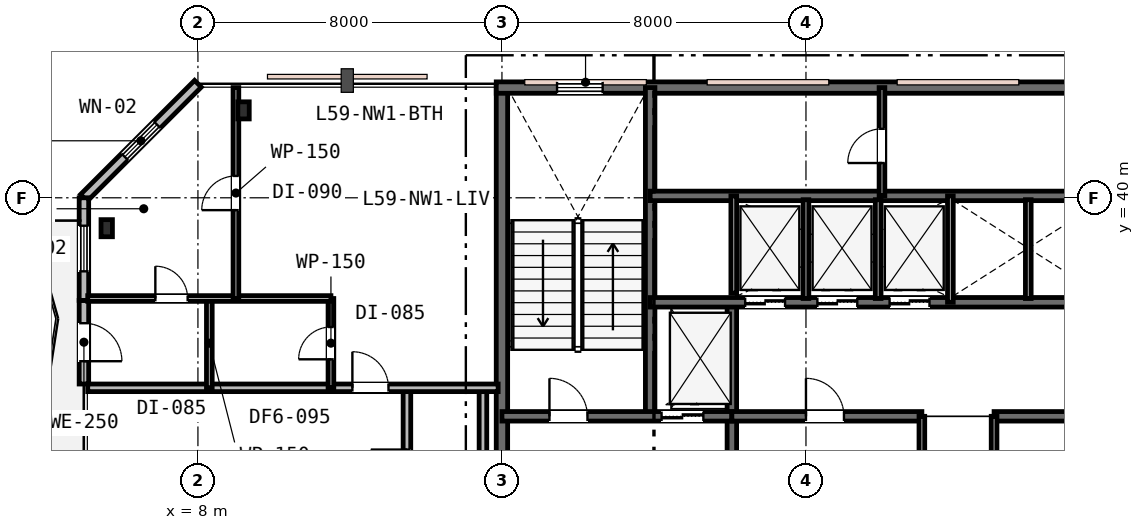
"""IFC4 building model, lengths in metres.
Left out: names, types, materials, properties, quantities, classifications, styles, units other than length and angle.
Written with IfcOpenShell. Run it as: python <this file> out.ifc"""

import sys

from ifc_helpers import new_model, si_unit, direction, frame, frame_2d, origin, origin_2d, place, context, subcontext, project, spatial, rectangle, i_section, extrude, element, fill, save


model = new_model("IFC4")
c1 = context("Model", 3, precision=1e-05, world=origin(), true_north=direction((0.0, 1.0)))
c2 = subcontext(c1, "Body", "Model", "MODEL_VIEW")
j1 = project(units=[si_unit("LENGTHUNIT", "METRE"), si_unit("PLANEANGLEUNIT", "RADIAN")], contexts=[c1])
p1 = place(None, origin())
s1 = spatial("IfcSite", under=j1, at=p1, CompositionType="ELEMENT")
p2 = place(p1, origin())
s2 = spatial("IfcBuilding", under=s1, at=p2, CompositionType="ELEMENT")
p3 = place(p2, frame((0.0, 0.0, 229.8)))
s3 = spatial("IfcBuildingStorey", under=s2, at=p3, CompositionType="ELEMENT", Elevation=229.8)
p4 = place(p3, frame((16.0, 30.65, 0.0), z_axis=(0.0, 0.0, 1.0), x_axis=(0.0, 1.0, 0.0)))
e1 = element("IfcWall", 1, at=p4, inside=s3, PredefinedType="SHEAR", context=c2, shape_type="SweptSolid", body=[
    extrude(rectangle(XDim=12.3, YDim=0.3, at=frame_2d((6.15, 0.0))), origin(), (0.0, 0.0, 1.0), 3.8),
])
p5 = place(p3, frame((15.85, 42.9, 0.0), z_axis=(0.0, 0.0, 1.0), x_axis=(1.0, 0.0, 0.0)))
e2 = element("IfcWall", 2, at=p5, inside=s3, PredefinedType="SHEAR", context=c2, shape_type="SweptSolid", body=[
    extrude(rectangle(XDim=24.3, YDim=0.3, at=frame_2d((12.15, 0.0))), origin(), (0.0, 0.0, 1.0), 3.8),
])
p6 = place(p5, frame((1.6, 0.0, 0.95)))
e3 = element("IfcOpeningElement", 3, at=p6, cuts=e2, PredefinedType="OPENING", context=c2, shape_type="SweptSolid", body=[
    extrude(rectangle(XDim=1.2, YDim=1.6, at=frame_2d((0.6, 0.8))), frame((0.0, 0.16, 0.0), z_axis=(0.0, -1.0, 0.0), x_axis=(1.0, 0.0, 0.0)), (0.0, 0.0, 1.0), 0.32),
])
p7 = place(p5, frame((16.5, 0.0, 0.95)))
e4 = element("IfcOpeningElement", 4, at=p7, cuts=e2, PredefinedType="OPENING", context=c2, shape_type="SweptSolid", body=[
    extrude(rectangle(XDim=1.2, YDim=1.6, at=frame_2d((0.6, 0.8))), frame((0.0, 0.16, 0.0), z_axis=(0.0, -1.0, 0.0), x_axis=(1.0, 0.0, 0.0)), (0.0, 0.0, 1.0), 0.32),
])
p8 = place(p5, frame((21.6, 0.0, 0.95)))
e5 = element("IfcOpeningElement", 5, at=p8, cuts=e2, PredefinedType="OPENING", context=c2, shape_type="SweptSolid", body=[
    extrude(rectangle(XDim=1.2, YDim=1.6, at=frame_2d((0.6, 0.8))), frame((0.0, 0.16, 0.0), z_axis=(0.0, -1.0, 0.0), x_axis=(1.0, 0.0, 0.0)), (0.0, 0.0, 1.0), 0.32),
])
p9 = place(p3, frame((19.9, 34.25, 0.0), z_axis=(0.0, 0.0, 1.0), x_axis=(0.0, 1.0, 0.0)))
e6 = element("IfcWall", 6, at=p9, inside=s3, PredefinedType="SHEAR", context=c2, shape_type="SweptSolid", body=[
    extrude(rectangle(XDim=8.65, YDim=0.25, at=frame_2d((4.325, 0.0))), origin(), (0.0, 0.0, 1.0), 3.8),
])
p10 = place(p3, frame((22.05, 30.8, 0.0), z_axis=(0.0, 0.0, 1.0), x_axis=(0.0, 1.0, 0.0)))
e7 = element("IfcWall", 7, at=p10, inside=s3, PredefinedType="SHEAR", context=c2, shape_type="SweptSolid", body=[
    extrude(rectangle(XDim=6.45, YDim=0.25, at=frame_2d((3.225, 0.0))), origin(), (0.0, 0.0, 1.0), 3.8),
])
p11 = place(p3, frame((16.0, 34.25, 0.0), z_axis=(0.0, 0.0, 1.0), x_axis=(1.0, 0.0, 0.0)))
e8 = element("IfcWall", 8, at=p11, inside=s3, PredefinedType="SHEAR", context=c2, shape_type="SweptSolid", body=[
    extrude(rectangle(XDim=6.05, YDim=0.25, at=frame_2d((3.025, 0.0))), origin(), (0.0, 0.0, 1.0), 3.8),
])
p12 = place(p11, frame((1.25, 0.0, 0.0)))
e9 = element("IfcOpeningElement", 9, at=p12, cuts=e8, PredefinedType="OPENING", context=c2, shape_type="SweptSolid", body=[
    extrude(rectangle(XDim=1.0, YDim=2.15, at=frame_2d((0.5, 1.075))), frame((0.0, 0.135, 0.0), z_axis=(0.0, -1.0, 0.0), x_axis=(1.0, 0.0, 0.0)), (0.0, 0.0, 1.0), 0.27),
])
p13 = place(p11, frame((4.2, 0.0, 0.0)))
e10 = element("IfcOpeningElement", 10, at=p13, cuts=e8, PredefinedType="OPENING", context=c2, shape_type="SweptSolid", body=[
    extrude(rectangle(XDim=1.1, YDim=2.15, at=frame_2d((0.55, 1.075))), frame((0.0, 0.135, 0.0), z_axis=(0.0, -1.0, 0.0), x_axis=(1.0, 0.0, 0.0)), (0.0, 0.0, 1.0), 0.27),
])
p14 = place(p3, frame((22.05, 34.25, 0.0), z_axis=(0.0, 0.0, 1.0), x_axis=(1.0, 0.0, 0.0)))
e11 = element("IfcWall", 11, at=p14, inside=s3, PredefinedType="SHEAR", context=c2, shape_type="SweptSolid", body=[
    extrude(rectangle(XDim=5.0, YDim=0.25, at=frame_2d((2.5, 0.0))), origin(), (0.0, 0.0, 1.0), 3.8),
])
p15 = place(p14, frame((1.95, 0.0, 0.0)))
e12 = element("IfcOpeningElement", 12, at=p15, cuts=e11, PredefinedType="OPENING", context=c2, shape_type="SweptSolid", body=[
    extrude(rectangle(XDim=1.0, YDim=2.15, at=frame_2d((0.5, 1.075))), frame((0.0, 0.135, 0.0), z_axis=(0.0, -1.0, 0.0), x_axis=(1.0, 0.0, 0.0)), (0.0, 0.0, 1.0), 0.27),
])
p16 = place(p3, frame((28.95, 34.25, 0.0), z_axis=(0.0, 0.0, 1.0), x_axis=(1.0, 0.0, 0.0)))
e13 = element("IfcWall", 13, at=p16, inside=s3, PredefinedType="SHEAR", context=c2, shape_type="SweptSolid", body=[
    extrude(rectangle(XDim=5.0, YDim=0.25, at=frame_2d((2.5, 0.0))), origin(), (0.0, 0.0, 1.0), 3.8),
])
p17 = place(p16, frame((1.95, 0.0, 0.0)))
e14 = element("IfcOpeningElement", 14, at=p17, cuts=e13, PredefinedType="OPENING", context=c2, shape_type="SweptSolid", body=[
    extrude(rectangle(XDim=1.0, YDim=2.15, at=frame_2d((0.5, 1.075))), frame((0.0, 0.135, 0.0), z_axis=(0.0, -1.0, 0.0), x_axis=(1.0, 0.0, 0.0)), (0.0, 0.0, 1.0), 0.27),
])
p18 = place(p3, frame((19.9, 37.25, 0.0), z_axis=(0.0, 0.0, 1.0), x_axis=(1.0, 0.0, 0.0)))
e15 = element("IfcWall", 15, at=p18, inside=s3, PredefinedType="SHEAR", context=c2, shape_type="SweptSolid", body=[
    extrude(rectangle(XDim=16.2, YDim=0.25, at=frame_2d((8.1, 0.0))), origin(), (0.0, 0.0, 1.0), 3.8),
])
p19 = place(p18, frame((12.55, 0.0, 0.0)))
e16 = element("IfcOpeningElement", 16, at=p19, cuts=e15, PredefinedType="OPENING", context=c2, shape_type="SweptSolid", body=[
    extrude(rectangle(XDim=0.9, YDim=2.15, at=frame_2d((0.45, 1.075))), frame((0.0, 0.135, 0.0), z_axis=(0.0, -1.0, 0.0), x_axis=(1.0, 0.0, 0.0)), (0.0, 0.0, 1.0), 0.27),
])
p20 = place(p18, frame((2.5, 0.0, 0.0)))
e17 = element("IfcOpeningElement", 17, at=p20, cuts=e15, PredefinedType="OPENING", context=c2, shape_type="SweptSolid", body=[
    extrude(rectangle(XDim=1.05, YDim=2.15, at=frame_2d((0.525, 1.075))), frame((0.0, 0.135, 0.0), z_axis=(0.0, -1.0, 0.0), x_axis=(1.0, 0.0, 0.0)), (0.0, 0.0, 1.0), 0.27),
])
p21 = place(p18, frame((4.4, 0.0, 0.0)))
e18 = element("IfcOpeningElement", 18, at=p21, cuts=e15, PredefinedType="OPENING", context=c2, shape_type="SweptSolid", body=[
    extrude(rectangle(XDim=1.05, YDim=2.15, at=frame_2d((0.525, 1.075))), frame((0.0, 0.135, 0.0), z_axis=(0.0, -1.0, 0.0), x_axis=(1.0, 0.0, 0.0)), (0.0, 0.0, 1.0), 0.27),
])
p22 = place(p18, frame((6.3, 0.0, 0.0)))
e19 = element("IfcOpeningElement", 19, at=p22, cuts=e15, PredefinedType="OPENING", context=c2, shape_type="SweptSolid", body=[
    extrude(rectangle(XDim=1.05, YDim=2.15, at=frame_2d((0.525, 1.075))), frame((0.0, 0.135, 0.0), z_axis=(0.0, -1.0, 0.0), x_axis=(1.0, 0.0, 0.0)), (0.0, 0.0, 1.0), 0.27),
])
p23 = place(p3, frame((19.9, 40.05, 0.0), z_axis=(0.0, 0.0, 1.0), x_axis=(1.0, 0.0, 0.0)))
e20 = element("IfcWall", 20, at=p23, inside=s3, PredefinedType="SHEAR", context=c2, shape_type="SweptSolid", body=[
    extrude(rectangle(XDim=12.05, YDim=0.25, at=frame_2d((6.025, 0.0))), origin(), (0.0, 0.0, 1.0), 3.8),
])
for number, where, z_axis, x_axis in (
    (21, (5.6, 39.2, 0.0), (0.0, 0.0, 1.0), (1.0, 0.0, 0.0)),
    (22, (9.2, 42.3, 0.0), (0.0, 0.0, 1.0), (1.0, 0.0, 0.0)),
):
    element("IfcColumn", number, at=place(p3, frame(where, z_axis=z_axis, x_axis=x_axis)), inside=s3, PredefinedType="COLUMN", context=c2, shape_type="SweptSolid", body=[
        extrude(i_section(OverallWidth=0.3, OverallDepth=0.45, WebThickness=0.014, FlangeThickness=0.026, FilletRadius=0.027, at=origin_2d()), origin(), (0.0, 0.0, 1.0), 3.8),
    ])
p24 = place(p3, frame((8.0, 43.0, 0.0), z_axis=(0.0, 0.0, 1.0), x_axis=(-0.707106781187, -0.707106781187, 0.0)))
e23 = element("IfcWall", 23, at=p24, inside=s3, PredefinedType="STANDARD", context=c2, shape_type="SweptSolid", body=[
    extrude(rectangle(XDim=4.243, YDim=0.25, at=frame_2d((2.121, 0.0))), origin(), (0.0, 0.0, 1.0), 3.53),
])
p25 = place(p24, frame((1.521, 0.0, 0.85)))
e24 = element("IfcOpeningElement", 24, at=p25, cuts=e23, PredefinedType="OPENING", context=c2, shape_type="SweptSolid", body=[
    extrude(rectangle(XDim=1.2, YDim=1.6, at=frame_2d((0.6, 0.8))), frame((0.0, 0.135, 0.0), z_axis=(0.0, -1.0, 0.0), x_axis=(1.0, 0.0, 0.0)), (0.0, 0.0, 1.0), 0.27),
])
p26 = place(p3, frame((5.0, 37.3, 0.0), z_axis=(0.0, 0.0, 1.0), x_axis=(0.0, -1.0, 0.0)))
e25 = element("IfcWall", 25, at=p26, inside=s3, PredefinedType="STANDARD", context=c2, shape_type="SweptSolid", body=[
    extrude(rectangle(XDim=2.2, YDim=0.25, at=frame_2d((1.1, 0.0))), origin(), (0.0, 0.0, 1.0), 3.53),
])
p27 = place(p26, frame((0.6, 0.0, 0.0)))
e26 = element("IfcOpeningElement", 26, at=p27, cuts=e25, PredefinedType="OPENING", context=c2, shape_type="SweptSolid", body=[
    extrude(rectangle(XDim=1.0, YDim=2.15, at=frame_2d((0.5, 1.075))), frame((0.0, 0.135, 0.0), z_axis=(0.0, -1.0, 0.0), x_axis=(1.0, 0.0, 0.0)), (0.0, 0.0, 1.0), 0.27),
])
p28 = place(p3, frame((5.0, 40.0, 0.0), z_axis=(0.0, 0.0, 1.0), x_axis=(0.0, -1.0, 0.0)))
e27 = element("IfcWall", 27, at=p28, inside=s3, PredefinedType="STANDARD", context=c2, shape_type="SweptSolid", body=[
    extrude(rectangle(XDim=2.7, YDim=0.25, at=frame_2d((1.35, 0.0))), origin(), (0.0, 0.0, 1.0), 3.53),
])
p29 = place(p28, frame((0.735, 0.0, 0.85)))
e28 = element("IfcOpeningElement", 28, at=p29, cuts=e27, PredefinedType="OPENING", context=c2, shape_type="SweptSolid", body=[
    extrude(rectangle(XDim=1.2, YDim=1.6, at=frame_2d((0.6, 0.8))), frame((0.0, 0.135, 0.0), z_axis=(0.0, -1.0, 0.0), x_axis=(1.0, 0.0, 0.0)), (0.0, 0.0, 1.0), 0.27),
])
for number, where, z_axis, x_axis in (
    (29, (27.05, 30.8, 0.0), (0.0, 0.0, 1.0), (0.0, 1.0, 0.0)),
    (30, (28.95, 30.8, 0.0), (0.0, 0.0, 1.0), (0.0, 1.0, 0.0)),
):
    element("IfcWall", number, at=place(p3, frame(where, z_axis=z_axis, x_axis=x_axis)), inside=s3, PredefinedType="PLUMBINGWALL", context=c2, shape_type="SweptSolid", body=[
        extrude(rectangle(XDim=3.45, YDim=0.15, at=frame_2d((1.725, 0.0))), origin(), (0.0, 0.0, 1.0), 3.22),
    ])
p30 = place(p3, frame((22.1, 37.49, 0.0), z_axis=(0.0, 0.0, 1.0), x_axis=(0.0, 1.0, 0.0)))
e31 = element("IfcWall", 31, at=p30, inside=s3, PredefinedType="PLUMBINGWALL", context=c2, shape_type="SweptSolid", body=[
    extrude(rectangle(XDim=2.56, YDim=0.15, at=frame_2d((1.28, 0.0))), origin(), (0.0, 0.0, 1.0), 3.53),
])
p31 = place(p3, frame((27.8, 37.25, 0.0), z_axis=(0.0, 0.0, 1.0), x_axis=(0.0, 1.0, 0.0)))
e32 = element("IfcWall", 32, at=p31, inside=s3, PredefinedType="PLUMBINGWALL", context=c2, shape_type="SweptSolid", body=[
    extrude(rectangle(XDim=2.8, YDim=0.15, at=frame_2d((1.4, 0.0))), origin(), (0.0, 0.0, 1.0), 3.53),
])
for number, where, z_axis, x_axis in (
    (33, (24.0, 37.35, 0.0), (0.0, 0.0, 1.0), (0.0, 1.0, 0.0)),
    (34, (25.9, 37.35, 0.0), (0.0, 0.0, 1.0), (0.0, 1.0, 0.0)),
    (35, (29.85, 37.35, 0.0), (0.0, 0.0, 1.0), (0.0, 1.0, 0.0)),
):
    element("IfcWall", number, at=place(p3, frame(where, z_axis=z_axis, x_axis=x_axis)), inside=s3, PredefinedType="PLUMBINGWALL", context=c2, shape_type="SweptSolid", body=[
        extrude(rectangle(XDim=2.6, YDim=0.15, at=frame_2d((1.3, 0.0))), origin(), (0.0, 0.0, 1.0), 3.53),
    ])
p32 = place(p3, frame((26.0, 40.05, 0.0), z_axis=(0.0, 0.0, 1.0), x_axis=(0.0, 1.0, 0.0)))
e36 = element("IfcWall", 36, at=p32, inside=s3, PredefinedType="PARTITIONING", context=c2, shape_type="SweptSolid", body=[
    extrude(rectangle(XDim=2.85, YDim=0.15, at=frame_2d((1.425, 0.0))), origin(), (0.0, 0.0, 1.0), 3.53),
])
p33 = place(p32, frame((0.865, 0.0, 0.0)))
e37 = element("IfcOpeningElement", 37, at=p33, cuts=e36, PredefinedType="OPENING", context=c2, shape_type="SweptSolid", body=[
    extrude(rectangle(XDim=0.9, YDim=2.15, at=frame_2d((0.45, 1.075))), frame((0.0, 0.085, 0.0), z_axis=(0.0, -1.0, 0.0), x_axis=(1.0, 0.0, 0.0)), (0.0, 0.0, 1.0), 0.17),
])
p34 = place(p3, frame((15.5, 30.8, 0.0), z_axis=(0.0, 0.0, 1.0), x_axis=(0.0, 1.0, 0.0)))
e38 = element("IfcWall", 38, at=p34, inside=s3, PredefinedType="PARTITIONING", context=c2, shape_type="SweptSolid", body=[
    extrude(rectangle(XDim=4.2, YDim=0.2, at=frame_2d((2.1, 0.0))), origin(), (0.0, 0.0, 1.0), 2.92),
])
p35 = place(p3, frame((13.5, 28.6, 0.0), z_axis=(0.0, 0.0, 1.0), x_axis=(0.0, 1.0, 0.0)))
e39 = element("IfcWall", 39, at=p35, inside=s3, PredefinedType="PARTITIONING", context=c2, shape_type="SweptSolid", body=[
    extrude(rectangle(XDim=6.4, YDim=0.2, at=frame_2d((3.2, 0.0))), origin(), (0.0, 0.0, 1.0), 2.92),
])
p36 = place(p35, frame((3.825, 0.0, 0.0)))
e40 = element("IfcOpeningElement", 40, at=p36, cuts=e39, PredefinedType="OPENING", context=c2, shape_type="SweptSolid", body=[
    extrude(rectangle(XDim=0.95, YDim=2.15, at=frame_2d((0.475, 1.075))), frame((0.0, 0.11, 0.0), z_axis=(0.0, -1.0, 0.0), x_axis=(1.0, 0.0, 0.0)), (0.0, 0.0, 1.0), 0.22),
])
p37 = place(p3, frame((5.1, 35.0, 0.0), z_axis=(0.0, 0.0, 1.0), x_axis=(1.0, 0.0, 0.0)))
e41 = element("IfcWall", 41, at=p37, inside=s3, PredefinedType="PARTITIONING", context=c2, shape_type="SweptSolid", body=[
    extrude(rectangle(XDim=10.8, YDim=0.2, at=frame_2d((5.4, 0.0))), origin(), (0.0, 0.0, 1.0), 3.24),
])
p38 = place(p37, frame((6.964, 0.0, 0.0)))
e42 = element("IfcOpeningElement", 42, at=p38, cuts=e41, PredefinedType="OPENING", context=c2, shape_type="SweptSolid", body=[
    extrude(rectangle(XDim=0.95, YDim=2.15, at=frame_2d((0.475, 1.075))), frame((0.0, 0.11, 0.0), z_axis=(0.0, -1.0, 0.0), x_axis=(1.0, 0.0, 0.0)), (0.0, 0.0, 1.0), 0.22),
])
p39 = place(p3, frame((11.5, 35.0, 0.0), z_axis=(0.0, 0.0, 1.0), x_axis=(0.0, 1.0, 0.0)))
e43 = element("IfcWall", 43, at=p39, inside=s3, PredefinedType="PARTITIONING", context=c2, shape_type="SweptSolid", body=[
    extrude(rectangle(XDim=2.35, YDim=0.15, at=frame_2d((1.175, 0.0))), origin(), (0.0, 0.0, 1.0), 3.53),
])
p40 = place(p39, frame((0.75, 0.0, 0.0)))
e44 = element("IfcOpeningElement", 44, at=p40, cuts=e43, PredefinedType="OPENING", context=c2, shape_type="SweptSolid", body=[
    extrude(rectangle(XDim=0.85, YDim=2.15, at=frame_2d((0.425, 1.075))), frame((0.0, 0.085, 0.0), z_axis=(0.0, -1.0, 0.0), x_axis=(1.0, 0.0, 0.0)), (0.0, 0.0, 1.0), 0.17),
])
p41 = place(p3, frame((8.3, 35.0, 0.0), z_axis=(0.0, 0.0, 1.0), x_axis=(0.0, 1.0, 0.0)))
e45 = element("IfcWall", 45, at=p41, inside=s3, PredefinedType="PARTITIONING", context=c2, shape_type="SweptSolid", body=[
    extrude(rectangle(XDim=2.35, YDim=0.15, at=frame_2d((1.175, 0.0))), origin(), (0.0, 0.0, 1.0), 3.53),
])
p42 = place(p3, frame((5.1, 37.35, 0.0), z_axis=(0.0, 0.0, 1.0), x_axis=(1.0, 0.0, 0.0)))
e46 = element("IfcWall", 46, at=p42, inside=s3, PredefinedType="PARTITIONING", context=c2, shape_type="SweptSolid", body=[
    extrude(rectangle(XDim=6.4, YDim=0.15, at=frame_2d((3.2, 0.0))), origin(), (0.0, 0.0, 1.0), 3.24),
])
p43 = place(p42, frame((1.78, 0.0, 0.0)))
e47 = element("IfcOpeningElement", 47, at=p43, cuts=e46, PredefinedType="OPENING", context=c2, shape_type="SweptSolid", body=[
    extrude(rectangle(XDim=0.85, YDim=2.15, at=frame_2d((0.425, 1.075))), frame((0.0, 0.085, 0.0), z_axis=(0.0, -1.0, 0.0), x_axis=(1.0, 0.0, 0.0)), (0.0, 0.0, 1.0), 0.17),
])
p44 = place(p3, frame((9.0, 37.35, 0.0), z_axis=(0.0, 0.0, 1.0), x_axis=(0.0, 1.0, 0.0)))
e48 = element("IfcWall", 48, at=p44, inside=s3, PredefinedType="PARTITIONING", context=c2, shape_type="SweptSolid", body=[
    extrude(rectangle(XDim=5.55, YDim=0.15, at=frame_2d((2.775, 0.0))), origin(), (0.0, 0.0, 1.0), 3.24),
])
p45 = place(p44, frame((2.325, 0.0, 0.0)))
e49 = element("IfcOpeningElement", 49, at=p45, cuts=e48, PredefinedType="OPENING", context=c2, shape_type="SweptSolid", body=[
    extrude(rectangle(XDim=0.9, YDim=2.15, at=frame_2d((0.45, 1.075))), frame((0.0, 0.085, 0.0), z_axis=(0.0, -1.0, 0.0), x_axis=(1.0, 0.0, 0.0)), (0.0, 0.0, 1.0), 0.17),
])
p46 = place(p6, origin())
e50 = element("IfcWindow", 50, at=p46, inside=s3, PartitioningType="SINGLE_PANEL", PredefinedType="WINDOW", context=c2, shape_type="SweptSolid", body=[
    extrude(rectangle(XDim=1.2, YDim=1.6, at=frame_2d((0.6, 0.8))), frame((0.0, 0.03, 0.0), z_axis=(0.0, -1.0, 0.0), x_axis=(1.0, 0.0, 0.0)), (0.0, 0.0, 1.0), 0.06),
])
fill(e3, e50)
p47 = place(p25, origin())
e51 = element("IfcWindow", 51, at=p47, inside=s3, PartitioningType="SINGLE_PANEL", PredefinedType="WINDOW", context=c2, shape_type="SweptSolid", body=[
    extrude(rectangle(XDim=1.2, YDim=1.6, at=frame_2d((0.6, 0.8))), frame((0.0, 0.03, 0.0), z_axis=(0.0, -1.0, 0.0), x_axis=(1.0, 0.0, 0.0)), (0.0, 0.0, 1.0), 0.06),
])
fill(e24, e51)
p48 = place(p27, origin())
e52 = element("IfcDoor", 52, at=p48, inside=s3, OperationType="SINGLE_SWING_RIGHT", PredefinedType="DOOR", context=c2, shape_type="SweptSolid", body=[
    extrude(rectangle(XDim=1.0, YDim=2.15, at=frame_2d((0.5, 1.075))), frame((0.0, 0.025, 0.0), z_axis=(0.0, -1.0, 0.0), x_axis=(1.0, 0.0, 0.0)), (0.0, 0.0, 1.0), 0.05),
])
fill(e26, e52)
p49 = place(p29, origin())
e53 = element("IfcWindow", 53, at=p49, inside=s3, PartitioningType="SINGLE_PANEL", PredefinedType="WINDOW", context=c2, shape_type="SweptSolid", body=[
    extrude(rectangle(XDim=1.2, YDim=1.6, at=frame_2d((0.6, 0.8))), frame((0.0, 0.03, 0.0), z_axis=(0.0, -1.0, 0.0), x_axis=(1.0, 0.0, 0.0)), (0.0, 0.0, 1.0), 0.06),
])
fill(e28, e53)
p50 = place(p12, origin())
e54 = element("IfcDoor", 54, at=p50, inside=s3, OperationType="SINGLE_SWING_LEFT", PredefinedType="DOOR", context=c2, shape_type="SweptSolid", body=[
    extrude(rectangle(XDim=1.0, YDim=2.15, at=frame_2d((0.5, 1.075))), frame((0.0, 0.025, 0.0), z_axis=(0.0, -1.0, 0.0), x_axis=(1.0, 0.0, 0.0)), (0.0, 0.0, 1.0), 0.05),
])
fill(e9, e54)
p51 = place(p15, origin())
e55 = element("IfcDoor", 55, at=p51, inside=s3, OperationType="SINGLE_SWING_LEFT", PredefinedType="DOOR", context=c2, shape_type="SweptSolid", body=[
    extrude(rectangle(XDim=1.0, YDim=2.15, at=frame_2d((0.5, 1.075))), frame((0.0, 0.025, 0.0), z_axis=(0.0, -1.0, 0.0), x_axis=(1.0, 0.0, 0.0)), (0.0, 0.0, 1.0), 0.05),
])
fill(e12, e55)
p52 = place(p33, origin())
e56 = element("IfcDoor", 56, at=p52, inside=s3, OperationType="SINGLE_SWING_LEFT", PredefinedType="DOOR", context=c2, shape_type="SweptSolid", body=[
    extrude(rectangle(XDim=0.9, YDim=2.15, at=frame_2d((0.45, 1.075))), frame((0.0, 0.025, 0.0), z_axis=(0.0, -1.0, 0.0), x_axis=(1.0, 0.0, 0.0)), (0.0, 0.0, 1.0), 0.05),
])
fill(e37, e56)
p53 = place(p36, origin())
e57 = element("IfcDoor", 57, at=p53, inside=s3, OperationType="SINGLE_SWING_RIGHT", PredefinedType="DOOR", context=c2, shape_type="SweptSolid", body=[
    extrude(rectangle(XDim=0.95, YDim=2.15, at=frame_2d((0.475, 1.075))), frame((0.0, 0.025, 0.0), z_axis=(0.0, -1.0, 0.0), x_axis=(1.0, 0.0, 0.0)), (0.0, 0.0, 1.0), 0.05),
])
fill(e40, e57)
p54 = place(p38, origin())
e58 = element("IfcDoor", 58, at=p54, inside=s3, OperationType="SINGLE_SWING_LEFT", PredefinedType="DOOR", context=c2, shape_type="SweptSolid", body=[
    extrude(rectangle(XDim=0.95, YDim=2.15, at=frame_2d((0.475, 1.075))), frame((0.0, 0.025, 0.0), z_axis=(0.0, -1.0, 0.0), x_axis=(1.0, 0.0, 0.0)), (0.0, 0.0, 1.0), 0.05),
])
fill(e42, e58)
p55 = place(p40, origin())
e59 = element("IfcDoor", 59, at=p55, inside=s3, OperationType="SINGLE_SWING_LEFT", PredefinedType="DOOR", context=c2, shape_type="SweptSolid", body=[
    extrude(rectangle(XDim=0.85, YDim=2.15, at=frame_2d((0.425, 1.075))), frame((0.0, 0.025, 0.0), z_axis=(0.0, -1.0, 0.0), x_axis=(1.0, 0.0, 0.0)), (0.0, 0.0, 1.0), 0.05),
])
fill(e44, e59)
p56 = place(p43, origin())
e60 = element("IfcDoor", 60, at=p56, inside=s3, OperationType="SINGLE_SWING_LEFT", PredefinedType="DOOR", context=c2, shape_type="SweptSolid", body=[
    extrude(rectangle(XDim=0.85, YDim=2.15, at=frame_2d((0.425, 1.075))), frame((0.0, 0.025, 0.0), z_axis=(0.0, -1.0, 0.0), x_axis=(1.0, 0.0, 0.0)), (0.0, 0.0, 1.0), 0.05),
])
fill(e47, e60)
p57 = place(p45, origin())
e61 = element("IfcDoor", 61, at=p57, inside=s3, OperationType="SINGLE_SWING_LEFT", PredefinedType="DOOR", context=c2, shape_type="SweptSolid", body=[
    extrude(rectangle(XDim=0.9, YDim=2.15, at=frame_2d((0.45, 1.075))), frame((0.0, 0.025, 0.0), z_axis=(0.0, -1.0, 0.0), x_axis=(1.0, 0.0, 0.0)), (0.0, 0.0, 1.0), 0.05),
])
fill(e49, e61)
p58 = place(p13, origin())
e62 = element("IfcDoor", 62, at=p58, inside=s3, OperationType="DOUBLE_DOOR_SLIDING", PredefinedType="DOOR", context=c2, shape_type="SweptSolid", body=[
    extrude(rectangle(XDim=1.1, YDim=2.15, at=frame_2d((0.55, 1.075))), frame((0.0, 0.025, 0.0), z_axis=(0.0, -1.0, 0.0), x_axis=(1.0, 0.0, 0.0)), (0.0, 0.0, 1.0), 0.05),
])
fill(e10, e62)
p59 = place(p20, origin())
e63 = element("IfcDoor", 63, at=p59, inside=s3, OperationType="DOUBLE_DOOR_SLIDING", PredefinedType="DOOR", context=c2, shape_type="SweptSolid", body=[
    extrude(rectangle(XDim=1.05, YDim=2.15, at=frame_2d((0.525, 1.075))), frame((0.0, 0.025, 0.0), z_axis=(0.0, -1.0, 0.0), x_axis=(1.0, 0.0, 0.0)), (0.0, 0.0, 1.0), 0.05),
])
fill(e17, e63)
p60 = place(p21, origin())
e64 = element("IfcDoor", 64, at=p60, inside=s3, OperationType="DOUBLE_DOOR_SLIDING", PredefinedType="DOOR", context=c2, shape_type="SweptSolid", body=[
    extrude(rectangle(XDim=1.05, YDim=2.15, at=frame_2d((0.525, 1.075))), frame((0.0, 0.025, 0.0), z_axis=(0.0, -1.0, 0.0), x_axis=(1.0, 0.0, 0.0)), (0.0, 0.0, 1.0), 0.05),
])
fill(e18, e64)
p61 = place(p22, origin())
e65 = element("IfcDoor", 65, at=p61, inside=s3, OperationType="DOUBLE_DOOR_SLIDING", PredefinedType="DOOR", context=c2, shape_type="SweptSolid", body=[
    extrude(rectangle(XDim=1.05, YDim=2.15, at=frame_2d((0.525, 1.075))), frame((0.0, 0.025, 0.0), z_axis=(0.0, -1.0, 0.0), x_axis=(1.0, 0.0, 0.0)), (0.0, 0.0, 1.0), 0.05),
])
fill(e19, e65)
save(model, sys.argv[1])
